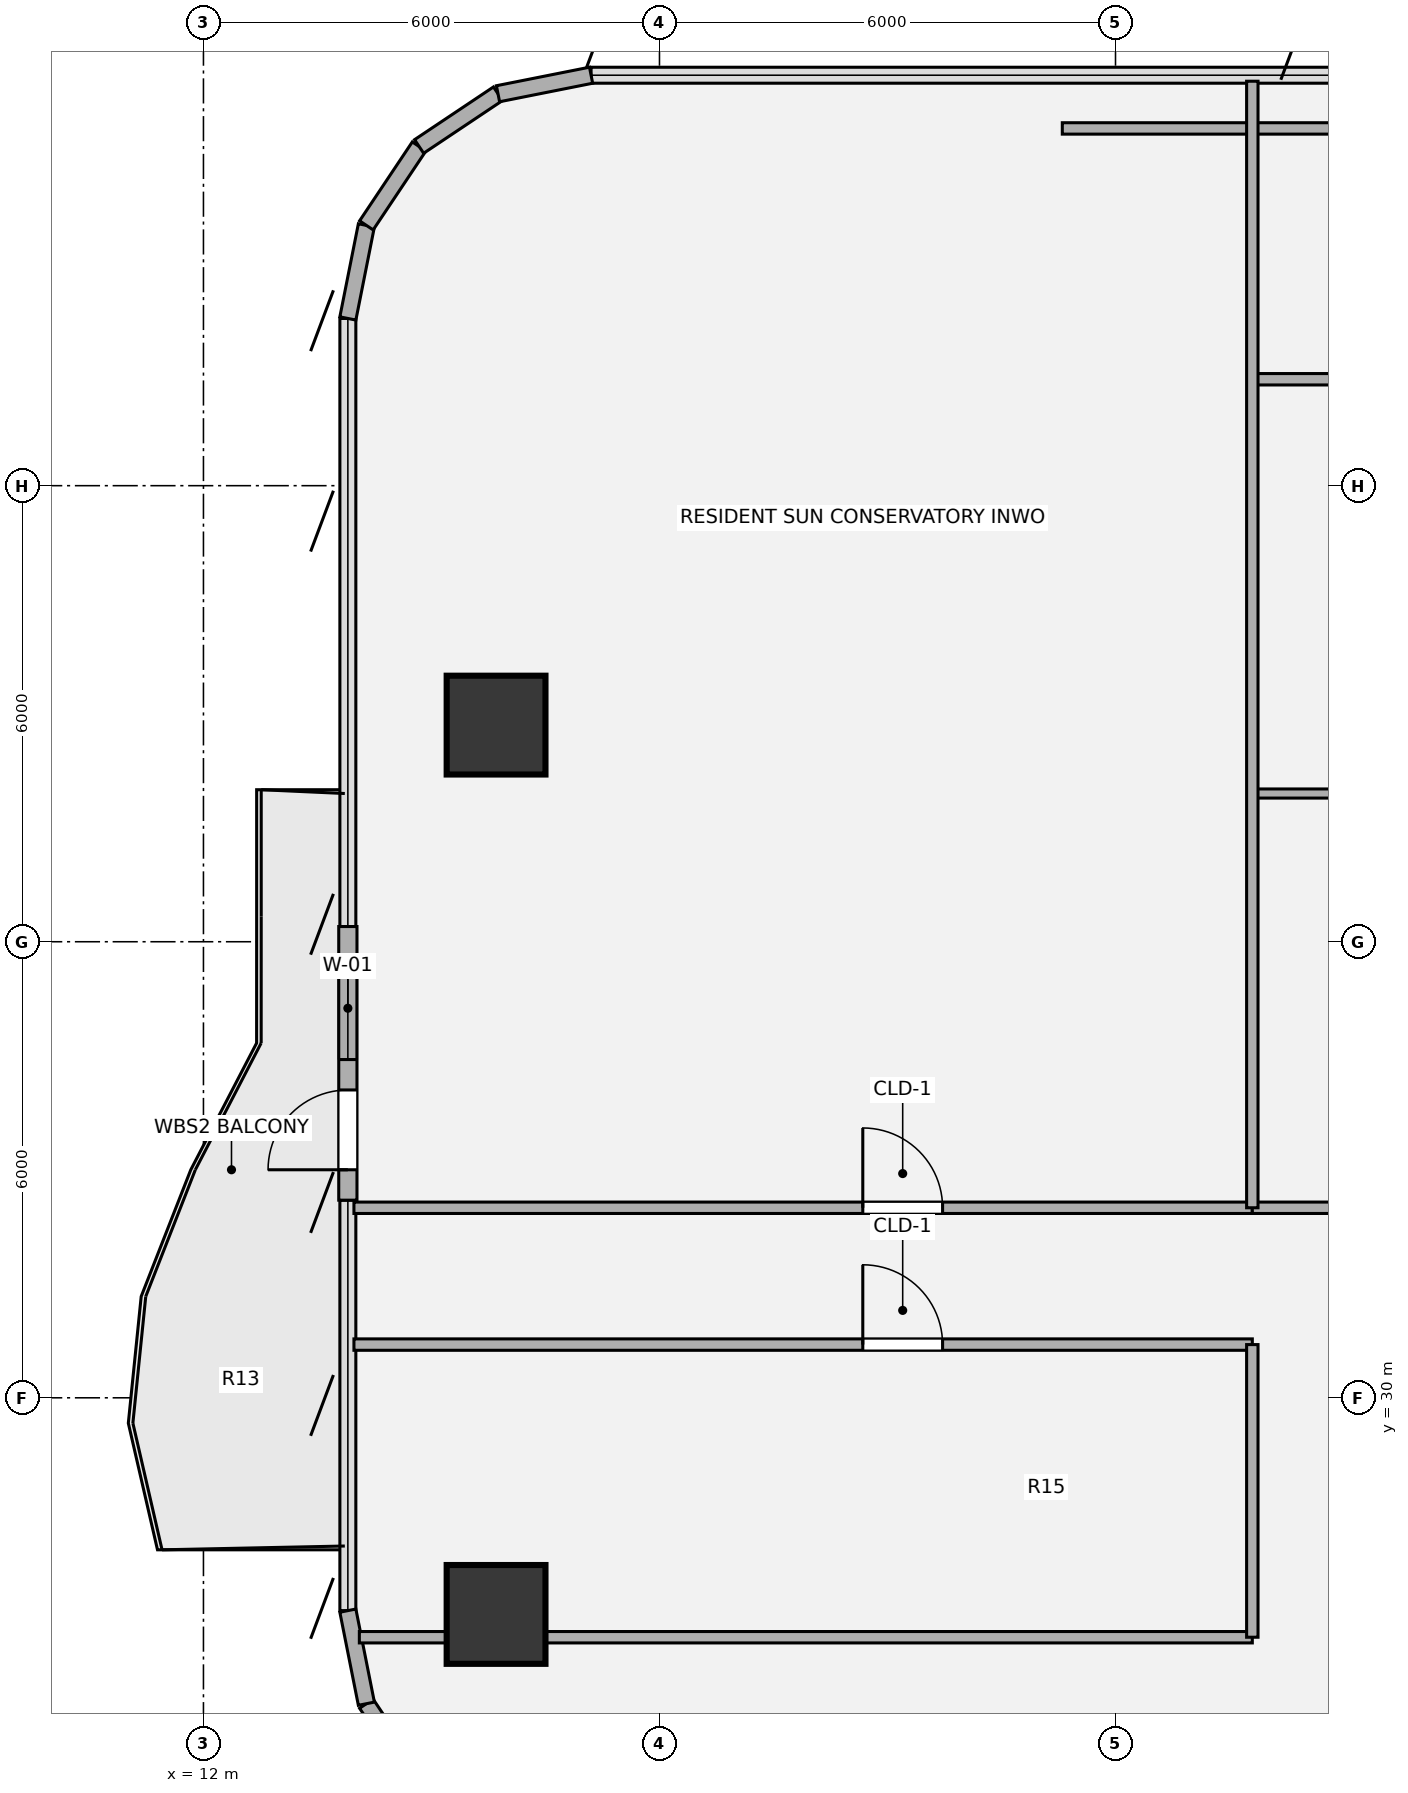
"""IFC4 building model, lengths in metres.
Left out: names, types, materials, properties, quantities, classifications, styles, units other than length and angle.
Written with IfcOpenShell. Run it as: python <this file> out.ifc"""

import sys

from ifc_helpers import new_model, si_unit, direction, frame, frame_2d, origin, origin_2d, place, context, subcontext, project, spatial, rectangle, hollow_circle, extrude, source, transform, mapped, element, fill, save


model = new_model("IFC4")
c1 = context("Model", 3, precision=1e-05, world=origin(), true_north=direction((0.0, 1.0)))
c2 = subcontext(c1, "Body", "Model", "MODEL_VIEW")
j1 = project(units=[si_unit("LENGTHUNIT", "METRE"), si_unit("PLANEANGLEUNIT", "RADIAN")], contexts=[c1])
p1 = place(None, origin())
s1 = spatial("IfcSite", under=j1, at=p1, CompositionType="ELEMENT")
p2 = place(p1, origin())
s2 = spatial("IfcBuilding", under=s1, at=p2, CompositionType="ELEMENT")
p3 = place(p2, frame((0.0, 0.0, 142.74)))
s3 = spatial("IfcBuildingStorey", under=s2, at=p3, CompositionType="ELEMENT", Elevation=142.74)
m1 = source(origin(), c2, "Body", "SweptSolid", [
    extrude(hollow_circle(Radius=0.65, WallThickness=0.045, at=origin_2d()), origin(), (0.0, 0.0, 1.0), 3.372),
])
for number, where, z_axis, x_axis in (
    (1, (15.85, 27.15, 0.0), (0.0, 0.0, 1.0), (1.0, 0.0, 0.0)),
    (2, (15.85, 38.85, 0.0), (0.0, 0.0, 1.0), (1.0, 0.0, 0.0)),
):
    element("IfcColumn", number, at=place(p3, frame(where, z_axis=z_axis, x_axis=x_axis)), inside=s3, PredefinedType="COLUMN", context=c2, shape_type="MappedRepresentation", body=[
        mapped(m1, transform((0.0, 0.0, 0.0), x_axis=(1.0, 0.0, 0.0), y_axis=(0.0, 1.0, 0.0), z_axis=(0.0, 0.0, 1.0), scale=1.0)),
    ])
for number, where, z_axis, x_axis in (
    (3, (14.837, 24.937, 0.0), (0.0, 0.0, 1.0), (-0.556, 0.831, 0.0)),
    (4, (14.144, 25.975, 0.0), (0.0, 0.0, 1.0), (-0.195, 0.981, 0.0)),
):
    element("IfcWall", number, at=place(p3, frame(where, z_axis=z_axis, x_axis=x_axis)), inside=s3, PredefinedType="SOLIDWALL", context=c2, shape_type="SweptSolid", body=[
        extrude(rectangle(XDim=1.249, YDim=0.215, at=frame_2d((0.624, 0.0))), origin(), (0.0, 0.0, 1.0), 3.372),
    ])
p4 = place(p3, frame((13.9, 32.6, 0.0), z_axis=(0.0, 0.0, 1.0), x_axis=(0.0, 1.0, 0.0)))
e5 = element("IfcWall", 5, at=p4, inside=s3, PredefinedType="SOLIDWALL", context=c2, shape_type="SweptSolid", body=[
    extrude(rectangle(XDim=3.6, YDim=0.24, at=frame_2d((1.8, 0.0))), origin(), (0.0, 0.0, 1.0), 3.372),
])
p5 = place(p4, frame((0.4, 0.0, 0.0)))
e6 = element("IfcOpeningElement", 6, at=p5, cuts=e5, PredefinedType="OPENING", context=c2, shape_type="SweptSolid", body=[
    extrude(rectangle(XDim=1.05, YDim=2.15, at=origin_2d()), frame((0.525, 0.13, 1.075), z_axis=(0.0, -1.0, 0.0), x_axis=(1.0, 0.0, 0.0)), (0.0, 0.0, 1.0), 0.26),
])
p6 = place(p4, frame((1.85, 0.0, 0.85)))
e7 = element("IfcOpeningElement", 7, at=p6, cuts=e5, PredefinedType="OPENING", context=c2, shape_type="SweptSolid", body=[
    extrude(rectangle(XDim=1.35, YDim=1.35, at=origin_2d()), frame((0.675, 0.13, 0.675), z_axis=(0.0, -1.0, 0.0), x_axis=(1.0, 0.0, 0.0)), (0.0, 0.0, 1.0), 0.26),
])
for number, where, z_axis, x_axis in (
    (8, (13.9, 44.2, 0.0), (0.0, 0.0, 1.0), (0.195, 0.981, 0.0)),
    (9, (14.144, 45.425, 0.0), (0.0, 0.0, 1.0), (0.556, 0.831, 0.0)),
    (10, (14.837, 46.463, 0.0), (0.0, 0.0, 1.0), (0.831, 0.556, 0.0)),
    (11, (15.875, 47.156, 0.0), (0.0, 0.0, 1.0), (0.981, 0.195, 0.0)),
):
    element("IfcWall", number, at=place(p3, frame(where, z_axis=z_axis, x_axis=x_axis)), inside=s3, PredefinedType="SOLIDWALL", context=c2, shape_type="SweptSolid", body=[
        extrude(rectangle(XDim=1.249, YDim=0.215, at=frame_2d((0.624, 0.0))), origin(), (0.0, 0.0, 1.0), 3.372),
    ])
p7 = place(p3, frame((14.051, 26.85, 0.0), z_axis=(0.0, 0.0, 1.0), x_axis=(1.0, 0.0, 0.0)))
e12 = element("IfcWall", 12, at=p7, inside=s3, PredefinedType="PARTITIONING", context=c2, shape_type="SweptSolid", body=[
    extrude(rectangle(XDim=11.749, YDim=0.15, at=frame_2d((5.875, 0.0))), origin(), (0.0, 0.0, 1.0), 1.857),
])
p8 = place(p3, frame((13.98, 30.7, 0.0), z_axis=(0.0, 0.0, 1.0), x_axis=(1.0, 0.0, 0.0)))
e13 = element("IfcWall", 13, at=p8, inside=s3, PredefinedType="PARTITIONING", context=c2, shape_type="SweptSolid", body=[
    extrude(rectangle(XDim=11.82, YDim=0.15, at=frame_2d((5.91, 0.0))), origin(), (0.0, 0.0, 1.0), 2.897),
])
p9 = place(p8, frame((6.695, 0.0, 0.0)))
e14 = element("IfcOpeningElement", 14, at=p9, cuts=e13, PredefinedType="OPENING", context=c2, shape_type="SweptSolid", body=[
    extrude(rectangle(XDim=1.05, YDim=2.1, at=origin_2d()), frame((0.525, 0.085, 1.05), z_axis=(0.0, -1.0, 0.0), x_axis=(1.0, 0.0, 0.0)), (0.0, 0.0, 1.0), 0.17),
])
p10 = place(p3, frame((13.98, 32.5, 0.0), z_axis=(0.0, 0.0, 1.0), x_axis=(1.0, 0.0, 0.0)))
e15 = element("IfcWall", 15, at=p10, inside=s3, PredefinedType="PARTITIONING", context=c2, shape_type="SweptSolid", body=[
    extrude(rectangle(XDim=11.82, YDim=0.15, at=frame_2d((5.91, 0.0))), origin(), (0.0, 0.0, 1.0), 2.824),
])
p11 = place(p10, frame((6.695, 0.0, 0.0)))
e16 = element("IfcOpeningElement", 16, at=p11, cuts=e15, PredefinedType="OPENING", context=c2, shape_type="SweptSolid", body=[
    extrude(rectangle(XDim=1.05, YDim=2.1, at=origin_2d()), frame((0.525, 0.085, 1.05), z_axis=(0.0, -1.0, 0.0), x_axis=(1.0, 0.0, 0.0)), (0.0, 0.0, 1.0), 0.17),
])
p12 = place(p3, frame((25.8, 32.5, 0.0), z_axis=(0.0, 0.0, 1.0), x_axis=(1.0, 0.0, 0.0)))
e17 = element("IfcWall", 17, at=p12, inside=s3, PredefinedType="PARTITIONING", context=c2, shape_type="SweptSolid", body=[
    extrude(rectangle(XDim=9.3, YDim=0.15, at=frame_2d((4.65, 0.0))), origin(), (0.0, 0.0, 1.0), 2.824),
])
p13 = place(p3, frame((25.8, 37.95, 0.0), z_axis=(0.0, 0.0, 1.0), x_axis=(1.0, 0.0, 0.0)))
e18 = element("IfcWall", 18, at=p13, inside=s3, PredefinedType="PARTITIONING", context=c2, shape_type="SweptSolid", body=[
    extrude(rectangle(XDim=3.65, YDim=0.12, at=frame_2d((1.825, 0.0))), origin(), (0.0, 0.0, 1.0), 3.342),
])
p14 = place(p3, frame((25.8, 43.4, 0.0), z_axis=(0.0, 0.0, 1.0), x_axis=(1.0, 0.0, 0.0)))
e19 = element("IfcWall", 19, at=p14, inside=s3, PredefinedType="PARTITIONING", context=c2, shape_type="SweptSolid", body=[
    extrude(rectangle(XDim=9.3, YDim=0.15, at=frame_2d((4.65, 0.0))), origin(), (0.0, 0.0, 1.0), 3.15),
])
p15 = place(p3, frame((23.3, 46.7, 0.0), z_axis=(0.0, 0.0, 1.0), x_axis=(1.0, 0.0, 0.0)))
e20 = element("IfcWall", 20, at=p15, inside=s3, PredefinedType="PARTITIONING", context=c2, shape_type="SweptSolid", body=[
    extrude(rectangle(XDim=11.8, YDim=0.15, at=frame_2d((5.9, 0.0))), origin(), (0.0, 0.0, 1.0), 3.15),
])
p16 = place(p3, frame((25.8, 26.85, 0.0), z_axis=(0.0, 0.0, 1.0), x_axis=(0.0, 1.0, 0.0)))
e21 = element("IfcWall", 21, at=p16, inside=s3, PredefinedType="PARTITIONING", context=c2, shape_type="SweptSolid", body=[
    extrude(rectangle(XDim=3.85, YDim=0.15, at=frame_2d((1.925, 0.0))), origin(), (0.0, 0.0, 1.0), 3.342),
])
p17 = place(p3, frame((25.8, 32.5, 0.0), z_axis=(0.0, 0.0, 1.0), x_axis=(0.0, 1.0, 0.0)))
e22 = element("IfcWall", 22, at=p17, inside=s3, PredefinedType="PARTITIONING", context=c2, shape_type="SweptSolid", body=[
    extrude(rectangle(XDim=14.821, YDim=0.15, at=frame_2d((7.411, 0.0))), origin(), (0.0, 0.0, 1.0), 3.342),
])
m2 = source(origin(), c2, "Body", "SweptSolid", [
    extrude(rectangle(XDim=1.05, YDim=2.15, at=origin_2d()), frame((0.525, 0.025, 1.075), z_axis=(0.0, -1.0, 0.0), x_axis=(1.0, 0.0, 0.0)), (0.0, 0.0, 1.0), 0.05),
])
p18 = place(p5, origin())
e23 = element("IfcDoor", 23, at=p18, inside=s3, OperationType="SINGLE_SWING_LEFT", PredefinedType="DOOR", context=c2, shape_type="MappedRepresentation", body=[
    mapped(m2, transform((0.0, 0.0, 0.0), x_axis=(1.0, 0.0, 0.0), y_axis=(0.0, 1.0, 0.0), z_axis=(0.0, 0.0, 1.0), scale=1.0)),
])
fill(e6, e23)
m3 = source(origin(), c2, "Body", "SweptSolid", [
    extrude(rectangle(XDim=1.35, YDim=1.35, at=origin_2d()), frame((0.675, 0.03, 0.675), z_axis=(0.0, -1.0, 0.0), x_axis=(1.0, 0.0, 0.0)), (0.0, 0.0, 1.0), 0.06),
])
p19 = place(p6, origin())
e24 = element("IfcWindow", 24, at=p19, inside=s3, PartitioningType="SINGLE_PANEL", PredefinedType="WINDOW", context=c2, shape_type="MappedRepresentation", body=[
    mapped(m3, transform((0.0, 0.0, 0.0), x_axis=(1.0, 0.0, 0.0), y_axis=(0.0, 1.0, 0.0), z_axis=(0.0, 0.0, 1.0), scale=1.0)),
])
fill(e7, e24)
m4 = source(origin(), c2, "Body", "SweptSolid", [
    extrude(rectangle(XDim=1.05, YDim=2.1, at=origin_2d()), frame((0.525, 0.025, 1.05), z_axis=(0.0, -1.0, 0.0), x_axis=(1.0, 0.0, 0.0)), (0.0, 0.0, 1.0), 0.05),
])
p20 = place(p9, origin())
e25 = element("IfcDoor", 25, at=p20, inside=s3, OperationType="SINGLE_SWING_LEFT", PredefinedType="DOOR", context=c2, shape_type="MappedRepresentation", body=[
    mapped(m4, transform((0.0, 0.0, 0.0), x_axis=(1.0, 0.0, 0.0), y_axis=(0.0, 1.0, 0.0), z_axis=(0.0, 0.0, 1.0), scale=1.0)),
])
fill(e14, e25)
p21 = place(p11, origin())
e26 = element("IfcDoor", 26, at=p21, inside=s3, OperationType="SINGLE_SWING_LEFT", PredefinedType="DOOR", context=c2, shape_type="MappedRepresentation", body=[
    mapped(m4, transform((0.0, 0.0, 0.0), x_axis=(1.0, 0.0, 0.0), y_axis=(0.0, 1.0, 0.0), z_axis=(0.0, 0.0, 1.0), scale=1.0)),
])
fill(e16, e26)
save(model, sys.argv[1])
